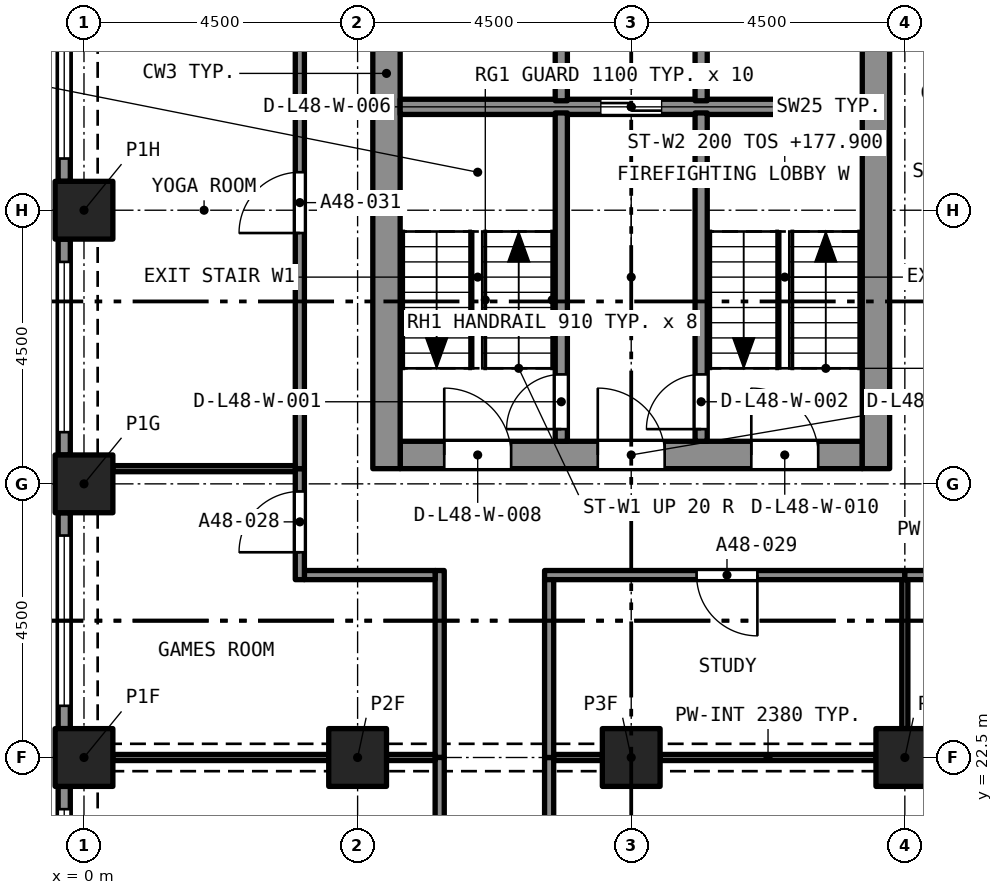
"""IFC4 building model, lengths in metres.
Left out: names, types, materials, properties, quantities, classifications, styles, units other than length and angle.
Written with IfcOpenShell. Run it as: python <this file> out.ifc"""

import sys

from ifc_helpers import new_model, si_unit, direction, frame, frame_2d, origin, origin_2d, place, context, subcontext, project, spatial, rectangle, extrude, element, fill, save


model = new_model("IFC4")
c1 = context("Model", 3, precision=1e-05, world=origin(), true_north=direction((0.0, 1.0)))
c2 = subcontext(c1, "Body", "Model", "MODEL_VIEW")
j1 = project(units=[si_unit("LENGTHUNIT", "METRE"), si_unit("PLANEANGLEUNIT", "RADIAN")], contexts=[c1])
p1 = place(None, origin())
s1 = spatial("IfcSite", under=j1, at=p1, CompositionType="ELEMENT")
p2 = place(p1, origin())
s2 = spatial("IfcBuilding", under=s1, at=p2, CompositionType="ELEMENT")
p3 = place(p2, frame((0.0, 0.0, 176.3)))
s3 = spatial("IfcBuildingStorey", under=s2, at=p3, CompositionType="ELEMENT", Elevation=176.3)
for number, where, z_axis, x_axis in (
    (1, (0.0, 22.5, 0.0), (0.0, 0.0, 1.0), (1.0, 0.0, 0.0)),
    (2, (4.5, 22.5, 0.0), (0.0, 0.0, 1.0), (1.0, 0.0, 0.0)),
    (3, (9.0, 22.5, 0.0), (0.0, 0.0, 1.0), (1.0, 0.0, 0.0)),
    (4, (13.5, 22.5, 0.0), (0.0, 0.0, 1.0), (1.0, 0.0, 0.0)),
    (5, (0.0, 27.0, 0.0), (0.0, 0.0, 1.0), (1.0, 0.0, 0.0)),
    (6, (0.0, 31.5, 0.0), (0.0, 0.0, 1.0), (1.0, 0.0, 0.0)),
):
    element("IfcColumn", number, at=place(p3, frame(where, z_axis=z_axis, x_axis=x_axis)), inside=s3, PredefinedType="COLUMN", context=c2, shape_type="SweptSolid", body=[
        extrude(rectangle(XDim=0.95, YDim=0.95, at=origin_2d()), origin(), (0.0, 0.0, 1.0), 3.2),
    ])
p4 = place(p3, frame((5.2, 27.475, 0.0), z_axis=(0.0, 0.0, 1.0), x_axis=(1.0, 0.0, 0.0)))
e7 = element("IfcWall", 7, at=p4, inside=s3, PredefinedType="SOLIDWALL", context=c2, shape_type="SweptSolid", body=[
    extrude(rectangle(XDim=7.6, YDim=0.45, at=frame_2d((3.8, 0.0))), origin(), (0.0, 0.0, 1.0), 3.2),
])
p5 = place(p4, frame((0.725, 0.0, 0.0)))
e8 = element("IfcOpeningElement", 8, at=p5, cuts=e7, PredefinedType="OPENING", context=c2, shape_type="SweptSolid", body=[
    extrude(rectangle(XDim=1.1, YDim=2.1, at=frame_2d((0.55, 1.05))), frame((0.0, 0.235, 0.0), z_axis=(0.0, -1.0, 0.0), x_axis=(1.0, 0.0, 0.0)), (0.0, 0.0, 1.0), 0.47),
])
p6 = place(p4, frame((3.25, 0.0, 0.0)))
e9 = element("IfcOpeningElement", 9, at=p6, cuts=e7, PredefinedType="OPENING", context=c2, shape_type="SweptSolid", body=[
    extrude(rectangle(XDim=1.1, YDim=2.1, at=frame_2d((0.55, 1.05))), frame((0.0, 0.235, 0.0), z_axis=(0.0, -1.0, 0.0), x_axis=(1.0, 0.0, 0.0)), (0.0, 0.0, 1.0), 0.47),
])
p7 = place(p4, frame((5.775, 0.0, 0.0)))
e10 = element("IfcOpeningElement", 10, at=p7, cuts=e7, PredefinedType="OPENING", context=c2, shape_type="SweptSolid", body=[
    extrude(rectangle(XDim=1.1, YDim=2.1, at=frame_2d((0.55, 1.05))), frame((0.0, 0.235, 0.0), z_axis=(0.0, -1.0, 0.0), x_axis=(1.0, 0.0, 0.0)), (0.0, 0.0, 1.0), 0.47),
])
p8 = place(p3, frame((4.975, 27.25, 0.0), z_axis=(0.0, 0.0, 1.0), x_axis=(0.0, 1.0, 0.0)))
e11 = element("IfcWall", 11, at=p8, inside=s3, PredefinedType="SOLIDWALL", context=c2, shape_type="SweptSolid", body=[
    extrude(rectangle(XDim=13.0, YDim=0.45, at=frame_2d((6.5, 0.0))), origin(), (0.0, 0.0, 1.0), 3.2),
])
p9 = place(p8, frame((8.7, 0.0, 0.0)))
e12 = element("IfcOpeningElement", 12, at=p9, cuts=e11, PredefinedType="OPENING", context=c2, shape_type="SweptSolid", body=[
    extrude(rectangle(XDim=1.2, YDim=2.1, at=frame_2d((0.6, 1.05))), frame((0.0, 0.235, 0.0), z_axis=(0.0, -1.0, 0.0), x_axis=(1.0, 0.0, 0.0)), (0.0, 0.0, 1.0), 0.47),
])
p10 = place(p3, frame((13.025, 27.25, 0.0), z_axis=(0.0, 0.0, 1.0), x_axis=(0.0, 1.0, 0.0)))
e13 = element("IfcWall", 13, at=p10, inside=s3, PredefinedType="SOLIDWALL", context=c2, shape_type="SweptSolid", body=[
    extrude(rectangle(XDim=13.0, YDim=0.45, at=frame_2d((6.5, 0.0))), origin(), (0.0, 0.0, 1.0), 3.2),
])
p11 = place(p10, frame((10.85, 0.0, 0.0)))
e14 = element("IfcOpeningElement", 14, at=p11, cuts=e13, PredefinedType="OPENING", context=c2, shape_type="SweptSolid", body=[
    extrude(rectangle(XDim=1.1, YDim=2.1, at=frame_2d((0.55, 1.05))), frame((0.0, 0.235, 0.0), z_axis=(0.0, -1.0, 0.0), x_axis=(1.0, 0.0, 0.0)), (0.0, 0.0, 1.0), 0.47),
])
p12 = place(p10, frame((8.7, 0.0, 0.0)))
e15 = element("IfcOpeningElement", 15, at=p12, cuts=e13, PredefinedType="OPENING", context=c2, shape_type="SweptSolid", body=[
    extrude(rectangle(XDim=1.2, YDim=2.1, at=frame_2d((0.6, 1.05))), frame((0.0, 0.235, 0.0), z_axis=(0.0, -1.0, 0.0), x_axis=(1.0, 0.0, 0.0)), (0.0, 0.0, 1.0), 0.47),
])
p13 = place(p3, frame((-0.325, 31.975, 0.0), z_axis=(0.0, 0.0, 1.0), x_axis=(0.0, 1.0, 0.0)))
e16 = element("IfcWall", 16, at=p13, inside=s3, PredefinedType="SOLIDWALL", context=c2, shape_type="SweptSolid", body=[
    extrude(rectangle(XDim=3.55, YDim=0.2, at=frame_2d((1.775, 0.0))), origin(), (0.0, 0.0, 1.0), 3.2),
])
p14 = place(p13, frame((0.375, 0.0, 0.45)))
e17 = element("IfcOpeningElement", 17, at=p14, cuts=e16, PredefinedType="OPENING", context=c2, shape_type="SweptSolid", body=[
    extrude(rectangle(XDim=2.8, YDim=1.95, at=frame_2d((1.4, 0.975))), frame((0.0, 0.11, 0.0), z_axis=(0.0, -1.0, 0.0), x_axis=(1.0, 0.0, 0.0)), (0.0, 0.0, 1.0), 0.22),
])
p15 = place(p3, frame((-0.325, 27.475, 0.0), z_axis=(0.0, 0.0, 1.0), x_axis=(0.0, 1.0, 0.0)))
e18 = element("IfcWall", 18, at=p15, inside=s3, PredefinedType="SOLIDWALL", context=c2, shape_type="SweptSolid", body=[
    extrude(rectangle(XDim=3.55, YDim=0.2, at=frame_2d((1.775, 0.0))), origin(), (0.0, 0.0, 1.0), 3.2),
])
p16 = place(p15, frame((0.375, 0.0, 0.45)))
e19 = element("IfcOpeningElement", 19, at=p16, cuts=e18, PredefinedType="OPENING", context=c2, shape_type="SweptSolid", body=[
    extrude(rectangle(XDim=2.8, YDim=1.95, at=frame_2d((1.4, 0.975))), frame((0.0, 0.11, 0.0), z_axis=(0.0, -1.0, 0.0), x_axis=(1.0, 0.0, 0.0)), (0.0, 0.0, 1.0), 0.22),
])
p17 = place(p3, frame((-0.325, 22.975, 0.0), z_axis=(0.0, 0.0, 1.0), x_axis=(0.0, 1.0, 0.0)))
e20 = element("IfcWall", 20, at=p17, inside=s3, PredefinedType="SOLIDWALL", context=c2, shape_type="SweptSolid", body=[
    extrude(rectangle(XDim=3.55, YDim=0.2, at=frame_2d((1.775, 0.0))), origin(), (0.0, 0.0, 1.0), 3.2),
])
p18 = place(p17, frame((0.375, 0.0, 0.45)))
e21 = element("IfcOpeningElement", 21, at=p18, cuts=e20, PredefinedType="OPENING", context=c2, shape_type="SweptSolid", body=[
    extrude(rectangle(XDim=2.8, YDim=1.95, at=frame_2d((1.4, 0.975))), frame((0.0, 0.11, 0.0), z_axis=(0.0, -1.0, 0.0), x_axis=(1.0, 0.0, 0.0)), (0.0, 0.0, 1.0), 0.22),
])
p19 = place(p3, frame((-0.325, 18.475, 0.0), z_axis=(0.0, 0.0, 1.0), x_axis=(0.0, 1.0, 0.0)))
e22 = element("IfcWall", 22, at=p19, inside=s3, PredefinedType="SOLIDWALL", context=c2, shape_type="SweptSolid", body=[
    extrude(rectangle(XDim=3.55, YDim=0.2, at=frame_2d((1.775, 0.0))), origin(), (0.0, 0.0, 1.0), 3.2),
])
p20 = place(p19, frame((0.375, 0.0, 0.45)))
e23 = element("IfcOpeningElement", 23, at=p20, cuts=e22, PredefinedType="OPENING", context=c2, shape_type="SweptSolid", body=[
    extrude(rectangle(XDim=2.8, YDim=1.95, at=frame_2d((1.4, 0.975))), frame((0.0, 0.11, 0.0), z_axis=(0.0, -1.0, 0.0), x_axis=(1.0, 0.0, 0.0)), (0.0, 0.0, 1.0), 0.22),
])
p21 = place(p3, frame((7.65, 22.5, 0.0), z_axis=(0.0, 0.0, 1.0), x_axis=(0.0, -1.0, 0.0)))
e24 = element("IfcWall", 24, at=p21, inside=s3, PredefinedType="PARTITIONING", context=c2, shape_type="SweptSolid", body=[
    extrude(rectangle(XDim=6.875, YDim=0.15, at=frame_2d((3.438, 0.0))), origin(), (0.0, 0.0, 1.0), 2.9),
])
p22 = place(p21, frame((2.938, 0.0, 0.0)))
e25 = element("IfcOpeningElement", 25, at=p22, cuts=e24, PredefinedType="OPENING", context=c2, shape_type="SweptSolid", body=[
    extrude(rectangle(XDim=1.0, YDim=2.1, at=frame_2d((0.5, 1.05))), frame((0.0, 0.085, 0.0), z_axis=(0.0, -1.0, 0.0), x_axis=(1.0, 0.0, 0.0)), (0.0, 0.0, 1.0), 0.17),
])
p23 = place(p3, frame((7.725, 22.5, 0.0), z_axis=(0.0, 0.0, 1.0), x_axis=(1.0, 0.0, 0.0)))
e26 = element("IfcWall", 26, at=p23, inside=s3, PredefinedType="PARTITIONING", context=c2, shape_type="SweptSolid", body=[
    extrude(rectangle(XDim=0.8, YDim=0.1, at=frame_2d((0.4, 0.0))), origin(), (0.0, 0.0, 1.0), 2.38),
])
p24 = place(p3, frame((9.475, 22.5, 0.0), z_axis=(0.0, 0.0, 1.0), x_axis=(1.0, 0.0, 0.0)))
e27 = element("IfcWall", 27, at=p24, inside=s3, PredefinedType="PARTITIONING", context=c2, shape_type="SweptSolid", body=[
    extrude(rectangle(XDim=3.55, YDim=0.1, at=frame_2d((1.775, 0.0))), origin(), (0.0, 0.0, 1.0), 2.38),
])
p25 = place(p3, frame((5.85, 22.5, 0.0), z_axis=(0.0, 0.0, 1.0), x_axis=(0.0, 1.0, 0.0)))
e28 = element("IfcWall", 28, at=p25, inside=s3, PredefinedType="PARTITIONING", context=c2, shape_type="SweptSolid", body=[
    extrude(rectangle(XDim=3.075, YDim=0.15, at=frame_2d((1.538, 0.0))), origin(), (0.0, 0.0, 1.0), 2.9),
])
p26 = place(p3, frame((3.625, 25.5, 0.0), z_axis=(0.0, 0.0, 1.0), x_axis=(1.0, 0.0, 0.0)))
e29 = element("IfcWall", 29, at=p26, inside=s3, PredefinedType="PARTITIONING", context=c2, shape_type="SweptSolid", body=[
    extrude(rectangle(XDim=2.15, YDim=0.15, at=frame_2d((1.075, 0.0))), origin(), (0.0, 0.0, 1.0), 2.9),
])
p27 = place(p3, frame((3.55, 25.425, 0.0), z_axis=(0.0, 0.0, 1.0), x_axis=(0.0, 1.0, 0.0)))
e30 = element("IfcWall", 30, at=p27, inside=s3, PredefinedType="PARTITIONING", context=c2, shape_type="SweptSolid", body=[
    extrude(rectangle(XDim=1.825, YDim=0.15, at=frame_2d((0.913, 0.0))), origin(), (0.0, 0.0, 1.0), 2.9),
])
p28 = place(p27, frame((0.45, 0.0, 0.0)))
e31 = element("IfcOpeningElement", 31, at=p28, cuts=e30, PredefinedType="OPENING", context=c2, shape_type="SweptSolid", body=[
    extrude(rectangle(XDim=1.0, YDim=2.1, at=frame_2d((0.5, 1.05))), frame((0.0, 0.085, 0.0), z_axis=(0.0, -1.0, 0.0), x_axis=(1.0, 0.0, 0.0)), (0.0, 0.0, 1.0), 0.17),
])
p29 = place(p3, frame((13.5, 25.5, 0.0), z_axis=(0.0, 0.0, 1.0), x_axis=(-1.0, 0.0, 0.0)))
e32 = element("IfcWall", 32, at=p29, inside=s3, PredefinedType="PARTITIONING", context=c2, shape_type="SweptSolid", body=[
    extrude(rectangle(XDim=5.925, YDim=0.15, at=frame_2d((2.962, 0.0))), origin(), (0.0, 0.0, 1.0), 2.9),
])
p30 = place(p29, frame((2.425, 0.0, 0.0)))
e33 = element("IfcOpeningElement", 33, at=p30, cuts=e32, PredefinedType="OPENING", context=c2, shape_type="SweptSolid", body=[
    extrude(rectangle(XDim=1.0, YDim=2.1, at=frame_2d((0.5, 1.05))), frame((0.0, 0.085, 0.0), z_axis=(0.0, -1.0, 0.0), x_axis=(1.0, 0.0, 0.0)), (0.0, 0.0, 1.0), 0.17),
])
p31 = place(p3, frame((7.65, 22.5, 0.0), z_axis=(0.0, 0.0, 1.0), x_axis=(0.0, 1.0, 0.0)))
e34 = element("IfcWall", 34, at=p31, inside=s3, PredefinedType="PARTITIONING", context=c2, shape_type="SweptSolid", body=[
    extrude(rectangle(XDim=2.925, YDim=0.15, at=frame_2d((1.462, 0.0))), origin(), (0.0, 0.0, 1.0), 2.9),
])
p32 = place(p3, frame((17.925, 25.5, 0.0), z_axis=(0.0, 0.0, 1.0), x_axis=(-1.0, 0.0, 0.0)))
e35 = element("IfcWall", 35, at=p32, inside=s3, PredefinedType="PARTITIONING", context=c2, shape_type="SweptSolid", body=[
    extrude(rectangle(XDim=4.425, YDim=0.15, at=frame_2d((2.212, 0.0))), origin(), (0.0, 0.0, 1.0), 2.9),
])
p33 = place(p32, frame((1.675, 0.0, 0.0)))
e36 = element("IfcOpeningElement", 36, at=p33, cuts=e35, PredefinedType="OPENING", context=c2, shape_type="SweptSolid", body=[
    extrude(rectangle(XDim=1.0, YDim=2.1, at=frame_2d((0.5, 1.05))), frame((0.0, 0.085, 0.0), z_axis=(0.0, -1.0, 0.0), x_axis=(1.0, 0.0, 0.0)), (0.0, 0.0, 1.0), 0.17),
])
p34 = place(p3, frame((3.55, 27.25, 0.0), z_axis=(0.0, 0.0, 1.0), x_axis=(0.0, 1.0, 0.0)))
e37 = element("IfcWall", 37, at=p34, inside=s3, PredefinedType="PARTITIONING", context=c2, shape_type="SweptSolid", body=[
    extrude(rectangle(XDim=8.75, YDim=0.15, at=frame_2d((4.375, 0.0))), origin(), (0.0, 0.0, 1.0), 2.9),
])
p35 = place(p34, frame((3.875, 0.0, 0.0)))
e38 = element("IfcOpeningElement", 38, at=p35, cuts=e37, PredefinedType="OPENING", context=c2, shape_type="SweptSolid", body=[
    extrude(rectangle(XDim=1.0, YDim=2.1, at=frame_2d((0.5, 1.05))), frame((0.0, 0.085, 0.0), z_axis=(0.0, -1.0, 0.0), x_axis=(1.0, 0.0, 0.0)), (0.0, 0.0, 1.0), 0.17),
])
p36 = place(p3, frame((5.85, 12.95, 0.0), z_axis=(0.0, 0.0, 1.0), x_axis=(0.0, 1.0, 0.0)))
e39 = element("IfcWall", 39, at=p36, inside=s3, PredefinedType="PARTITIONING", context=c2, shape_type="SweptSolid", body=[
    extrude(rectangle(XDim=9.55, YDim=0.15, at=frame_2d((4.775, 0.0))), origin(), (0.0, 0.0, 1.0), 2.9),
])
p37 = place(p36, frame((4.312, 0.0, 0.0)))
e40 = element("IfcOpeningElement", 40, at=p37, cuts=e39, PredefinedType="OPENING", context=c2, shape_type="SweptSolid", body=[
    extrude(rectangle(XDim=1.0, YDim=2.1, at=frame_2d((0.5, 1.05))), frame((0.0, 0.085, 0.0), z_axis=(0.0, -1.0, 0.0), x_axis=(1.0, 0.0, 0.0)), (0.0, 0.0, 1.0), 0.17),
])
p38 = place(p3, frame((0.475, 27.25, 0.0), z_axis=(0.0, 0.0, 1.0), x_axis=(1.0, 0.0, 0.0)))
e41 = element("IfcWall", 41, at=p38, inside=s3, PredefinedType="PARTITIONING", context=c2, shape_type="SweptSolid", body=[
    extrude(rectangle(XDim=3.0, YDim=0.1, at=frame_2d((1.5, 0.0))), origin(), (0.0, 0.0, 1.0), 2.9),
])
p39 = place(p3, frame((4.975, 22.5, 0.0), z_axis=(0.0, 0.0, 1.0), x_axis=(1.0, 0.0, 0.0)))
e42 = element("IfcWall", 42, at=p39, inside=s3, PredefinedType="PARTITIONING", context=c2, shape_type="SweptSolid", body=[
    extrude(rectangle(XDim=0.8, YDim=0.1, at=frame_2d((0.4, 0.0))), origin(), (0.0, 0.0, 1.0), 2.38),
])
p40 = place(p3, frame((0.475, 22.5, 0.0), z_axis=(0.0, 0.0, 1.0), x_axis=(1.0, 0.0, 0.0)))
e43 = element("IfcWall", 43, at=p40, inside=s3, PredefinedType="PARTITIONING", context=c2, shape_type="SweptSolid", body=[
    extrude(rectangle(XDim=3.55, YDim=0.1, at=frame_2d((1.775, 0.0))), origin(), (0.0, 0.0, 1.0), 2.38),
])
p41 = place(p3, frame((13.5, 22.975, 0.0), z_axis=(0.0, 0.0, 1.0), x_axis=(0.0, 1.0, 0.0)))
e44 = element("IfcWall", 44, at=p41, inside=s3, PredefinedType="PARTITIONING", context=c2, shape_type="SweptSolid", body=[
    extrude(rectangle(XDim=2.45, YDim=0.1, at=frame_2d((1.225, 0.0))), origin(), (0.0, 0.0, 1.0), 2.9),
])
p42 = place(p3, frame((5.2, 33.2, 0.0), z_axis=(0.0, 0.0, 1.0), x_axis=(1.0, 0.0, 0.0)))
e45 = element("IfcWall", 45, at=p42, inside=s3, PredefinedType="SOLIDWALL", context=c2, shape_type="SweptSolid", body=[
    extrude(rectangle(XDim=7.6, YDim=0.25, at=frame_2d((3.8, 0.0))), origin(), (0.0, 0.0, 1.0), 2.9),
])
p43 = place(p42, frame((3.3, 0.0, 0.0)))
e46 = element("IfcOpeningElement", 46, at=p43, cuts=e45, PredefinedType="OPENING", context=c2, shape_type="SweptSolid", body=[
    extrude(rectangle(XDim=1.0, YDim=2.1, at=frame_2d((0.5, 1.05))), frame((0.0, 0.135, 0.0), z_axis=(0.0, -1.0, 0.0), x_axis=(1.0, 0.0, 0.0)), (0.0, 0.0, 1.0), 0.27),
])
p44 = place(p3, frame((7.85, 27.7, 0.0), z_axis=(0.0, 0.0, 1.0), x_axis=(0.0, 1.0, 0.0)))
e47 = element("IfcWall", 47, at=p44, inside=s3, PredefinedType="SOLIDWALL", context=c2, shape_type="SweptSolid", body=[
    extrude(rectangle(XDim=5.4, YDim=0.2, at=frame_2d((2.7, 0.0))), origin(), (0.0, 0.0, 1.0), 2.9),
])
p45 = place(p44, frame((0.2, 0.0, 0.0)))
e48 = element("IfcOpeningElement", 48, at=p45, cuts=e47, PredefinedType="OPENING", context=c2, shape_type="SweptSolid", body=[
    extrude(rectangle(XDim=0.9, YDim=2.1, at=frame_2d((0.45, 1.05))), frame((0.0, 0.11, 0.0), z_axis=(0.0, -1.0, 0.0), x_axis=(1.0, 0.0, 0.0)), (0.0, 0.0, 1.0), 0.22),
])
p46 = place(p3, frame((10.15, 27.7, 0.0), z_axis=(0.0, 0.0, 1.0), x_axis=(0.0, 1.0, 0.0)))
e49 = element("IfcWall", 49, at=p46, inside=s3, PredefinedType="SOLIDWALL", context=c2, shape_type="SweptSolid", body=[
    extrude(rectangle(XDim=5.4, YDim=0.2, at=frame_2d((2.7, 0.0))), origin(), (0.0, 0.0, 1.0), 2.9),
])
p47 = place(p46, frame((0.2, 0.0, 0.0)))
e50 = element("IfcOpeningElement", 50, at=p47, cuts=e49, PredefinedType="OPENING", context=c2, shape_type="SweptSolid", body=[
    extrude(rectangle(XDim=0.9, YDim=2.1, at=frame_2d((0.45, 1.05))), frame((0.0, 0.11, 0.0), z_axis=(0.0, -1.0, 0.0), x_axis=(1.0, 0.0, 0.0)), (0.0, 0.0, 1.0), 0.22),
])
for number, where, z_axis, x_axis in (
    (51, (7.85, 33.3, 0.0), (0.0, 0.0, 1.0), (0.0, 1.0, 0.0)),
    (52, (10.15, 33.3, 0.0), (0.0, 0.0, 1.0), (0.0, 1.0, 0.0)),
):
    element("IfcWall", number, at=place(p3, frame(where, z_axis=z_axis, x_axis=x_axis)), inside=s3, PredefinedType="SOLIDWALL", context=c2, shape_type="SweptSolid", body=[
        extrude(rectangle(XDim=2.3, YDim=0.2, at=frame_2d((1.15, 0.0))), origin(), (0.0, 0.0, 1.0), 2.9),
    ])
p48 = place(p14, origin())
e53 = element("IfcWindow", 53, at=p48, inside=s3, PartitioningType="SINGLE_PANEL", PredefinedType="WINDOW", context=c2, shape_type="SweptSolid", body=[
    extrude(rectangle(XDim=2.8, YDim=1.95, at=frame_2d((1.4, 0.975))), frame((0.0, 0.03, 0.0), z_axis=(0.0, -1.0, 0.0), x_axis=(1.0, 0.0, 0.0)), (0.0, 0.0, 1.0), 0.06),
])
fill(e17, e53)
p49 = place(p16, origin())
e54 = element("IfcWindow", 54, at=p49, inside=s3, PartitioningType="SINGLE_PANEL", PredefinedType="WINDOW", context=c2, shape_type="SweptSolid", body=[
    extrude(rectangle(XDim=2.8, YDim=1.95, at=frame_2d((1.4, 0.975))), frame((0.0, 0.03, 0.0), z_axis=(0.0, -1.0, 0.0), x_axis=(1.0, 0.0, 0.0)), (0.0, 0.0, 1.0), 0.06),
])
fill(e19, e54)
p50 = place(p18, origin())
e55 = element("IfcWindow", 55, at=p50, inside=s3, PartitioningType="SINGLE_PANEL", PredefinedType="WINDOW", context=c2, shape_type="SweptSolid", body=[
    extrude(rectangle(XDim=2.8, YDim=1.95, at=frame_2d((1.4, 0.975))), frame((0.0, 0.03, 0.0), z_axis=(0.0, -1.0, 0.0), x_axis=(1.0, 0.0, 0.0)), (0.0, 0.0, 1.0), 0.06),
])
fill(e21, e55)
p51 = place(p20, origin())
e56 = element("IfcWindow", 56, at=p51, inside=s3, PartitioningType="SINGLE_PANEL", PredefinedType="WINDOW", context=c2, shape_type="SweptSolid", body=[
    extrude(rectangle(XDim=2.8, YDim=1.95, at=frame_2d((1.4, 0.975))), frame((0.0, 0.03, 0.0), z_axis=(0.0, -1.0, 0.0), x_axis=(1.0, 0.0, 0.0)), (0.0, 0.0, 1.0), 0.06),
])
fill(e23, e56)
p52 = place(p28, origin())
e57 = element("IfcDoor", 57, at=p52, inside=s3, OperationType="SINGLE_SWING_RIGHT", PredefinedType="DOOR", context=c2, shape_type="SweptSolid", body=[
    extrude(rectangle(XDim=1.0, YDim=2.1, at=frame_2d((0.5, 1.05))), frame((0.0, 0.025, 0.0), z_axis=(0.0, -1.0, 0.0), x_axis=(1.0, 0.0, 0.0)), (0.0, 0.0, 1.0), 0.05),
])
fill(e31, e57)
p53 = place(p30, origin())
e58 = element("IfcDoor", 58, at=p53, inside=s3, OperationType="SINGLE_SWING_LEFT", PredefinedType="DOOR", context=c2, shape_type="SweptSolid", body=[
    extrude(rectangle(XDim=1.0, YDim=2.1, at=frame_2d((0.5, 1.05))), frame((0.0, 0.025, 0.0), z_axis=(0.0, -1.0, 0.0), x_axis=(1.0, 0.0, 0.0)), (0.0, 0.0, 1.0), 0.05),
])
fill(e33, e58)
p54 = place(p35, origin())
e59 = element("IfcDoor", 59, at=p54, inside=s3, OperationType="SINGLE_SWING_RIGHT", PredefinedType="DOOR", context=c2, shape_type="SweptSolid", body=[
    extrude(rectangle(XDim=1.0, YDim=2.1, at=frame_2d((0.5, 1.05))), frame((0.0, 0.025, 0.0), z_axis=(0.0, -1.0, 0.0), x_axis=(1.0, 0.0, 0.0)), (0.0, 0.0, 1.0), 0.05),
])
fill(e38, e59)
p55 = place(p45, origin())
e60 = element("IfcDoor", 60, at=p55, inside=s3, OperationType="SINGLE_SWING_LEFT", PredefinedType="DOOR", context=c2, shape_type="SweptSolid", body=[
    extrude(rectangle(XDim=0.9, YDim=2.1, at=frame_2d((0.45, 1.05))), frame((0.0, 0.025, 0.0), z_axis=(0.0, -1.0, 0.0), x_axis=(1.0, 0.0, 0.0)), (0.0, 0.0, 1.0), 0.05),
])
fill(e48, e60)
p56 = place(p47, origin())
e61 = element("IfcDoor", 61, at=p56, inside=s3, OperationType="SINGLE_SWING_LEFT", PredefinedType="DOOR", context=c2, shape_type="SweptSolid", body=[
    extrude(rectangle(XDim=0.9, YDim=2.1, at=frame_2d((0.45, 1.05))), frame((0.0, 0.025, 0.0), z_axis=(0.0, -1.0, 0.0), x_axis=(1.0, 0.0, 0.0)), (0.0, 0.0, 1.0), 0.05),
])
fill(e50, e61)
p57 = place(p43, origin())
e62 = element("IfcDoor", 62, at=p57, inside=s3, OperationType="SLIDING_TO_LEFT", PredefinedType="DOOR", context=c2, shape_type="SweptSolid", body=[
    extrude(rectangle(XDim=1.0, YDim=2.1, at=frame_2d((0.5, 1.05))), frame((0.0, 0.025, 0.0), z_axis=(0.0, -1.0, 0.0), x_axis=(1.0, 0.0, 0.0)), (0.0, 0.0, 1.0), 0.05),
])
fill(e46, e62)
p58 = place(p5, origin())
e63 = element("IfcDoor", 63, at=p58, inside=s3, OperationType="SINGLE_SWING_LEFT", PredefinedType="DOOR", context=c2, shape_type="SweptSolid", body=[
    extrude(rectangle(XDim=1.1, YDim=2.1, at=frame_2d((0.55, 1.05))), frame((0.0, 0.025, 0.0), z_axis=(0.0, -1.0, 0.0), x_axis=(1.0, 0.0, 0.0)), (0.0, 0.0, 1.0), 0.05),
])
fill(e8, e63)
p59 = place(p6, origin())
e64 = element("IfcDoor", 64, at=p59, inside=s3, OperationType="SINGLE_SWING_LEFT", PredefinedType="DOOR", context=c2, shape_type="SweptSolid", body=[
    extrude(rectangle(XDim=1.1, YDim=2.1, at=frame_2d((0.55, 1.05))), frame((0.0, 0.025, 0.0), z_axis=(0.0, -1.0, 0.0), x_axis=(1.0, 0.0, 0.0)), (0.0, 0.0, 1.0), 0.05),
])
fill(e9, e64)
p60 = place(p7, origin())
e65 = element("IfcDoor", 65, at=p60, inside=s3, OperationType="SINGLE_SWING_LEFT", PredefinedType="DOOR", context=c2, shape_type="SweptSolid", body=[
    extrude(rectangle(XDim=1.1, YDim=2.1, at=frame_2d((0.55, 1.05))), frame((0.0, 0.025, 0.0), z_axis=(0.0, -1.0, 0.0), x_axis=(1.0, 0.0, 0.0)), (0.0, 0.0, 1.0), 0.05),
])
fill(e10, e65)
save(model, sys.argv[1])
